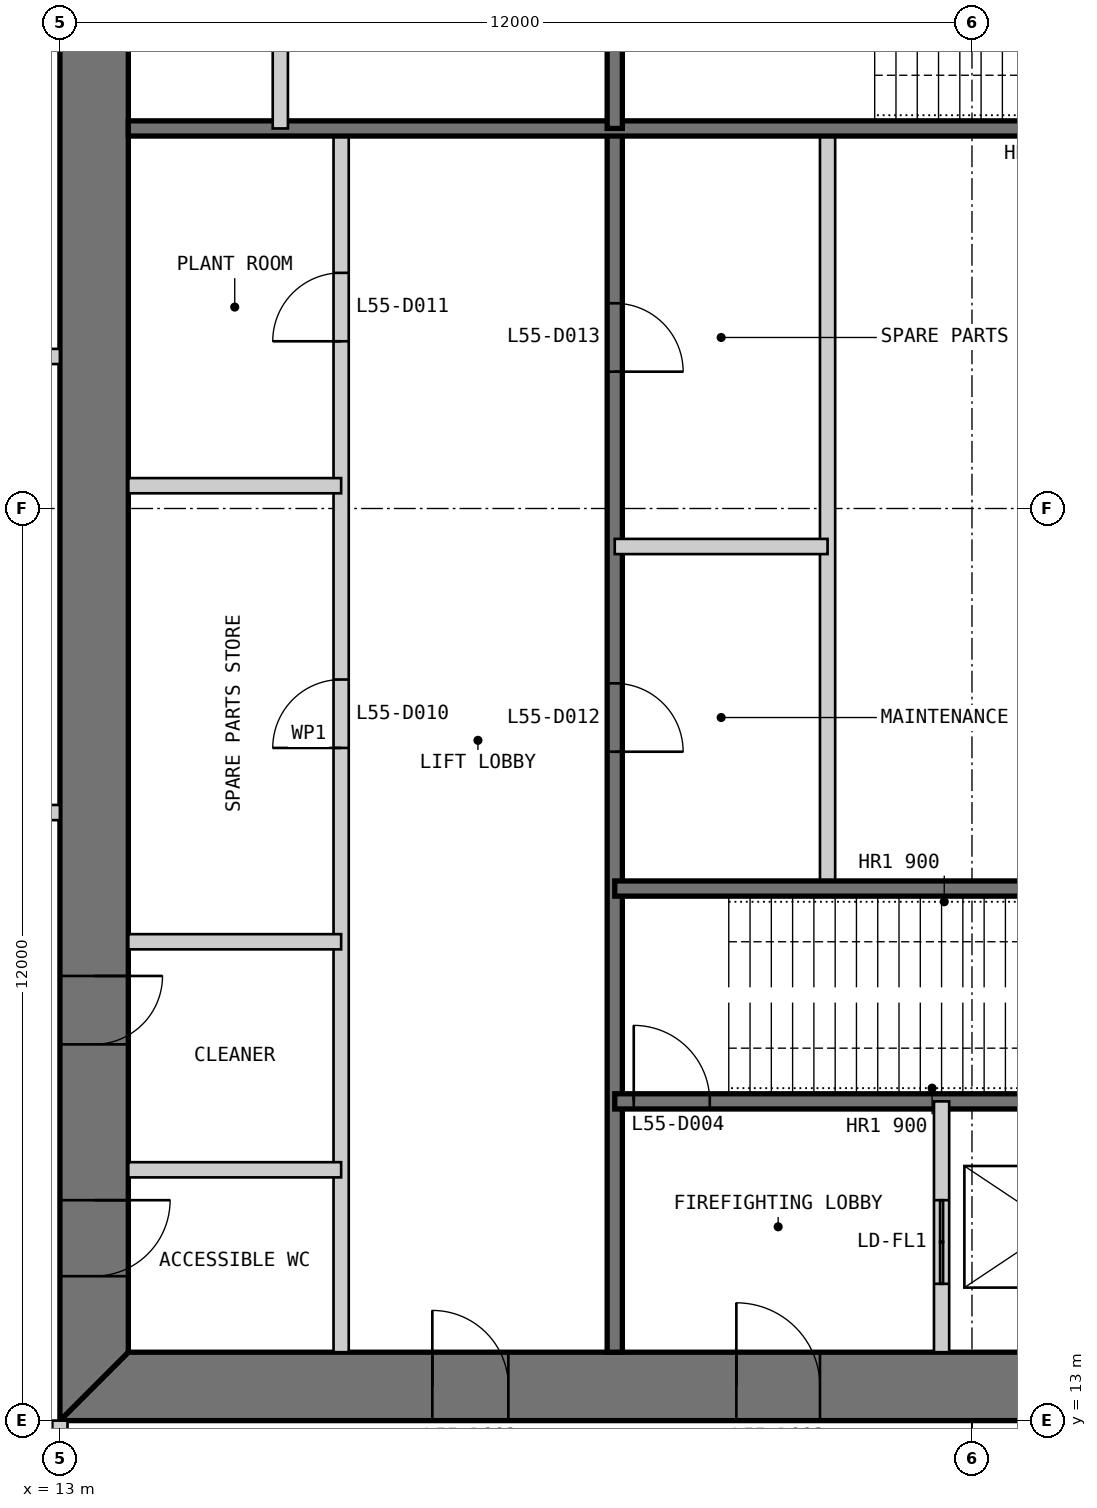
"""IFC4 building model, lengths in metres.
Left out: names, types, materials, properties, quantities, classifications, styles, units other than length and angle.
Written with IfcOpenShell. Run it as: python <this file> out.ifc"""

import sys

from ifc_helpers import new_model, si_unit, direction, frame, frame_2d, origin, place, context, subcontext, project, spatial, polyline, rectangle, outline, extrude, element, fill, save


model = new_model("IFC4")
c1 = context("Model", 3, precision=1e-05, world=origin(), true_north=direction((0.0, 1.0)))
c2 = subcontext(c1, "Body", "Model", "MODEL_VIEW")
j1 = project(units=[si_unit("LENGTHUNIT", "METRE"), si_unit("PLANEANGLEUNIT", "RADIAN")], contexts=[c1])
p1 = place(None, origin())
s1 = spatial("IfcSite", under=j1, at=p1, CompositionType="ELEMENT")
p2 = place(p1, origin())
s2 = spatial("IfcBuilding", under=s1, at=p2, CompositionType="ELEMENT")
p3 = place(p2, frame((0.0, 0.0, 233.8)))
s3 = spatial("IfcBuildingStorey", under=s2, at=p3, CompositionType="ELEMENT", Elevation=233.8)
p4 = place(p3, frame((13.0, 13.45, 0.0), z_axis=(0.0, 0.0, 1.0), x_axis=(1.0, 0.0, 0.0)))
e1 = element("IfcWall", 1, at=p4, inside=s3, PredefinedType="SHEAR", context=c2, shape_type="SweptSolid", body=[
    extrude(outline(polyline([(0.0, -0.45), (24.0, -0.45), (23.1, 0.45), (0.9, 0.45), (0.0, -0.45)])), origin(), (0.0, 0.0, 1.0), 6.0),
])
p5 = place(p4, frame((4.9, 0.0, 0.0)))
e2 = element("IfcOpeningElement", 2, at=p5, cuts=e1, PredefinedType="OPENING", context=c2, shape_type="SweptSolid", body=[
    extrude(rectangle(XDim=1.0, YDim=2.2, at=frame_2d((0.5, 1.1))), frame((0.0, 0.46, 0.0), z_axis=(0.0, -1.0, 0.0), x_axis=(1.0, 0.0, 0.0)), (0.0, 0.0, 1.0), 0.92),
])
p6 = place(p4, frame((8.9, 0.0, 0.0)))
e3 = element("IfcOpeningElement", 3, at=p6, cuts=e1, PredefinedType="OPENING", context=c2, shape_type="SweptSolid", body=[
    extrude(rectangle(XDim=1.1, YDim=2.2, at=frame_2d((0.55, 1.1))), frame((0.0, 0.46, 0.0), z_axis=(0.0, -1.0, 0.0), x_axis=(1.0, 0.0, 0.0)), (0.0, 0.0, 1.0), 0.92),
])
p7 = place(p4, frame((15.05, 0.0, 0.0)))
e4 = element("IfcOpeningElement", 4, at=p7, cuts=e1, PredefinedType="OPENING", context=c2, shape_type="SweptSolid", body=[
    extrude(rectangle(XDim=0.9, YDim=2.2, at=frame_2d((0.45, 1.1))), frame((0.0, 0.46, 0.0), z_axis=(0.0, -1.0, 0.0), x_axis=(1.0, 0.0, 0.0)), (0.0, 0.0, 1.0), 0.92),
])
p8 = place(p4, frame((17.9, 0.0, 0.0)))
e5 = element("IfcOpeningElement", 5, at=p8, cuts=e1, PredefinedType="OPENING", context=c2, shape_type="SweptSolid", body=[
    extrude(rectangle(XDim=1.0, YDim=2.2, at=frame_2d((0.5, 1.1))), frame((0.0, 0.46, 0.0), z_axis=(0.0, -1.0, 0.0), x_axis=(1.0, 0.0, 0.0)), (0.0, 0.0, 1.0), 0.92),
])
p9 = place(p4, frame((21.4, 0.0, 0.0)))
e6 = element("IfcOpeningElement", 6, at=p9, cuts=e1, PredefinedType="OPENING", context=c2, shape_type="SweptSolid", body=[
    extrude(rectangle(XDim=1.0, YDim=2.2, at=frame_2d((0.5, 1.1))), frame((0.0, 0.46, 0.0), z_axis=(0.0, -1.0, 0.0), x_axis=(1.0, 0.0, 0.0)), (0.0, 0.0, 1.0), 0.92),
])
p10 = place(p3, frame((13.45, 36.1, 0.0), z_axis=(0.0, 0.0, 1.0), x_axis=(0.0, -1.0, 0.0)))
e7 = element("IfcWall", 7, at=p10, inside=s3, PredefinedType="SHEAR", context=c2, shape_type="SweptSolid", body=[
    extrude(outline(polyline([(-0.9, -0.45), (23.1, -0.45), (22.2, 0.45), (0.0, 0.45), (-0.9, -0.45)])), origin(), (0.0, 0.0, 1.0), 6.0),
])
p11 = place(p10, frame((20.2, 0.0, 0.0)))
e8 = element("IfcOpeningElement", 8, at=p11, cuts=e7, PredefinedType="OPENING", context=c2, shape_type="SweptSolid", body=[
    extrude(rectangle(XDim=1.0, YDim=2.2, at=frame_2d((0.5, 1.1))), frame((0.0, 0.46, 0.0), z_axis=(0.0, -1.0, 0.0), x_axis=(1.0, 0.0, 0.0)), (0.0, 0.0, 1.0), 0.92),
])
p12 = place(p10, frame((17.25, 0.0, 0.0)))
e9 = element("IfcOpeningElement", 9, at=p12, cuts=e7, PredefinedType="OPENING", context=c2, shape_type="SweptSolid", body=[
    extrude(rectangle(XDim=0.9, YDim=2.2, at=frame_2d((0.45, 1.1))), frame((0.0, 0.46, 0.0), z_axis=(0.0, -1.0, 0.0), x_axis=(1.0, 0.0, 0.0)), (0.0, 0.0, 1.0), 0.92),
])
p13 = place(p3, frame((16.7, 13.9, 0.0), z_axis=(0.0, 0.0, 1.0), x_axis=(0.0, 1.0, 0.0)))
e10 = element("IfcWall", 10, at=p13, inside=s3, PredefinedType="PARTITIONING", context=c2, shape_type="SweptSolid", body=[
    extrude(rectangle(XDim=16.1, YDim=0.2, at=frame_2d((8.05, 0.0))), origin(), (0.0, 0.0, 1.0), 5.8),
])
p14 = place(p13, frame((7.95, 0.0, 0.0)))
e11 = element("IfcOpeningElement", 11, at=p14, cuts=e10, PredefinedType="OPENING", context=c2, shape_type="SweptSolid", body=[
    extrude(rectangle(XDim=0.9, YDim=2.2, at=frame_2d((0.45, 1.1))), frame((0.0, 0.11, 0.0), z_axis=(0.0, -1.0, 0.0), x_axis=(1.0, 0.0, 0.0)), (0.0, 0.0, 1.0), 0.22),
])
p15 = place(p13, frame((13.3, 0.0, 0.0)))
e12 = element("IfcOpeningElement", 12, at=p15, cuts=e10, PredefinedType="OPENING", context=c2, shape_type="SweptSolid", body=[
    extrude(rectangle(XDim=0.9, YDim=2.2, at=frame_2d((0.45, 1.1))), frame((0.0, 0.11, 0.0), z_axis=(0.0, -1.0, 0.0), x_axis=(1.0, 0.0, 0.0)), (0.0, 0.0, 1.0), 0.22),
])
p16 = place(p3, frame((20.3, 13.9, 0.0), z_axis=(0.0, 0.0, 1.0), x_axis=(0.0, 1.0, 0.0)))
e13 = element("IfcWall", 13, at=p16, inside=s3, PredefinedType="SOLIDWALL", context=c2, shape_type="SweptSolid", body=[
    extrude(rectangle(XDim=16.1, YDim=0.2, at=frame_2d((8.05, 0.0))), origin(), (0.0, 0.0, 1.0), 5.8),
])
p17 = place(p16, frame((7.9, 0.0, 0.0)))
e14 = element("IfcOpeningElement", 14, at=p17, cuts=e13, PredefinedType="OPENING", context=c2, shape_type="SweptSolid", body=[
    extrude(rectangle(XDim=0.9, YDim=2.2, at=frame_2d((0.45, 1.1))), frame((0.0, 0.11, 0.0), z_axis=(0.0, -1.0, 0.0), x_axis=(1.0, 0.0, 0.0)), (0.0, 0.0, 1.0), 0.22),
])
p18 = place(p16, frame((12.9, 0.0, 0.0)))
e15 = element("IfcOpeningElement", 15, at=p18, cuts=e13, PredefinedType="OPENING", context=c2, shape_type="SweptSolid", body=[
    extrude(rectangle(XDim=0.9, YDim=2.2, at=frame_2d((0.45, 1.1))), frame((0.0, 0.11, 0.0), z_axis=(0.0, -1.0, 0.0), x_axis=(1.0, 0.0, 0.0)), (0.0, 0.0, 1.0), 0.22),
])
p19 = place(p3, frame((23.1, 20.0, 0.0), z_axis=(0.0, 0.0, 1.0), x_axis=(0.0, 1.0, 0.0)))
e16 = element("IfcWall", 16, at=p19, inside=s3, PredefinedType="PARTITIONING", context=c2, shape_type="SweptSolid", body=[
    extrude(rectangle(XDim=10.0, YDim=0.2, at=frame_2d((5.0, 0.0))), origin(), (0.0, 0.0, 1.0), 5.8),
])
p20 = place(p3, frame((20.3, 17.2, 0.0), z_axis=(0.0, 0.0, 1.0), x_axis=(1.0, 0.0, 0.0)))
e17 = element("IfcWall", 17, at=p20, inside=s3, PredefinedType="SOLIDWALL", context=c2, shape_type="SweptSolid", body=[
    extrude(rectangle(XDim=9.4, YDim=0.2, at=frame_2d((4.7, 0.0))), origin(), (0.0, 0.0, 1.0), 5.8),
])
p21 = place(p20, frame((0.25, 0.0, 0.0)))
e18 = element("IfcOpeningElement", 18, at=p21, cuts=e17, PredefinedType="OPENING", context=c2, shape_type="SweptSolid", body=[
    extrude(rectangle(XDim=1.0, YDim=2.2, at=frame_2d((0.5, 1.1))), frame((0.0, 0.11, 0.0), z_axis=(0.0, -1.0, 0.0), x_axis=(1.0, 0.0, 0.0)), (0.0, 0.0, 1.0), 0.22),
])
p22 = place(p3, frame((20.3, 20.0, 0.0), z_axis=(0.0, 0.0, 1.0), x_axis=(1.0, 0.0, 0.0)))
e19 = element("IfcWall", 19, at=p22, inside=s3, PredefinedType="SOLIDWALL", context=c2, shape_type="SweptSolid", body=[
    extrude(rectangle(XDim=15.8, YDim=0.2, at=frame_2d((7.9, 0.0))), origin(), (0.0, 0.0, 1.0), 5.8),
])
p23 = place(p3, frame((24.6, 13.9, 0.0), z_axis=(0.0, 0.0, 1.0), x_axis=(0.0, 1.0, 0.0)))
e20 = element("IfcWall", 20, at=p23, inside=s3, PredefinedType="PARTITIONING", context=c2, shape_type="SweptSolid", body=[
    extrude(rectangle(XDim=3.3, YDim=0.2, at=frame_2d((1.65, 0.0))), origin(), (0.0, 0.0, 1.0), 5.8),
])
p24 = place(p23, frame((0.9, 0.0, 0.0)))
e21 = element("IfcOpeningElement", 21, at=p24, cuts=e20, PredefinedType="OPENING", context=c2, shape_type="SweptSolid", body=[
    extrude(rectangle(XDim=1.1, YDim=2.2, at=frame_2d((0.55, 1.1))), frame((0.0, 0.11, 0.0), z_axis=(0.0, -1.0, 0.0), x_axis=(1.0, 0.0, 0.0)), (0.0, 0.0, 1.0), 0.22),
])
for number, where, z_axis, x_axis in (
    (22, (13.9, 16.3, 0.0), (0.0, 0.0, 1.0), (1.0, 0.0, 0.0)),
    (23, (13.9, 19.3, 0.0), (0.0, 0.0, 1.0), (1.0, 0.0, 0.0)),
    (24, (13.9, 25.3, 0.0), (0.0, 0.0, 1.0), (1.0, 0.0, 0.0)),
    (25, (20.3, 24.5, 0.0), (0.0, 0.0, 1.0), (1.0, 0.0, 0.0)),
):
    element("IfcWall", number, at=place(p3, frame(where, z_axis=z_axis, x_axis=x_axis)), inside=s3, PredefinedType="PARTITIONING", context=c2, shape_type="SweptSolid", body=[
        extrude(rectangle(XDim=2.8, YDim=0.2, at=frame_2d((1.4, 0.0))), origin(), (0.0, 0.0, 1.0), 5.8),
    ])
p25 = place(p3, frame((29.7, 30.0, 0.0), z_axis=(0.0, 0.0, 1.0), x_axis=(-1.0, 0.0, 0.0)))
e26 = element("IfcWall", 26, at=p25, inside=s3, PredefinedType="SOLIDWALL", context=c2, shape_type="SweptSolid", body=[
    extrude(rectangle(XDim=15.8, YDim=0.2, at=frame_2d((7.9, 0.0))), origin(), (0.0, 0.0, 1.0), 5.8),
])
p26 = place(p3, frame((20.3, 36.1, 0.0), z_axis=(0.0, 0.0, 1.0), x_axis=(0.0, -1.0, 0.0)))
e27 = element("IfcWall", 27, at=p26, inside=s3, PredefinedType="SOLIDWALL", context=c2, shape_type="SweptSolid", body=[
    extrude(rectangle(XDim=6.1, YDim=0.2, at=frame_2d((3.05, 0.0))), origin(), (0.0, 0.0, 1.0), 5.8),
])
p27 = place(p3, frame((15.9, 36.1, 0.0), z_axis=(0.0, 0.0, 1.0), x_axis=(0.0, -1.0, 0.0)))
e28 = element("IfcWall", 28, at=p27, inside=s3, PredefinedType="PARTITIONING", context=c2, shape_type="SweptSolid", body=[
    extrude(rectangle(XDim=6.1, YDim=0.2, at=frame_2d((3.05, 0.0))), origin(), (0.0, 0.0, 1.0), 5.8),
])
p28 = place(p3, frame((13.0, 10.6, 0.0), z_axis=(0.0, 0.0, 1.0), x_axis=(0.0, 1.0, 0.0)))
e29 = element("IfcWall", 29, at=p28, inside=s3, PredefinedType="PARTITIONING", context=c2, shape_type="SweptSolid", body=[
    extrude(rectangle(XDim=2.4, YDim=0.2, at=frame_2d((1.2, 0.0))), origin(), (0.0, 0.0, 1.0), 4.705),
])
p29 = place(p3, frame((2.0, 21.0, 0.0), z_axis=(0.0, 0.0, 1.0), x_axis=(1.0, 0.0, 0.0)))
e30 = element("IfcWall", 30, at=p29, inside=s3, PredefinedType="PARTITIONING", context=c2, shape_type="SweptSolid", body=[
    extrude(rectangle(XDim=11.0, YDim=0.2, at=frame_2d((5.5, 0.0))), origin(), (0.0, 0.0, 1.0), 5.8),
])
p30 = place(p29, frame((4.6, 0.0, 0.0)))
e31 = element("IfcOpeningElement", 31, at=p30, cuts=e30, PredefinedType="OPENING", context=c2, shape_type="SweptSolid", body=[
    extrude(rectangle(XDim=1.8, YDim=2.4, at=frame_2d((0.9, 1.2))), frame((0.0, 0.11, 0.0), z_axis=(0.0, -1.0, 0.0), x_axis=(1.0, 0.0, 0.0)), (0.0, 0.0, 1.0), 0.22),
])
p31 = place(p3, frame((2.0, 27.0, 0.0), z_axis=(0.0, 0.0, 1.0), x_axis=(1.0, 0.0, 0.0)))
e32 = element("IfcWall", 32, at=p31, inside=s3, PredefinedType="PARTITIONING", context=c2, shape_type="SweptSolid", body=[
    extrude(rectangle(XDim=11.0, YDim=0.2, at=frame_2d((5.5, 0.0))), origin(), (0.0, 0.0, 1.0), 5.8),
])
p32 = place(p31, frame((4.6, 0.0, 0.0)))
e33 = element("IfcOpeningElement", 33, at=p32, cuts=e32, PredefinedType="OPENING", context=c2, shape_type="SweptSolid", body=[
    extrude(rectangle(XDim=1.8, YDim=2.4, at=frame_2d((0.9, 1.2))), frame((0.0, 0.11, 0.0), z_axis=(0.0, -1.0, 0.0), x_axis=(1.0, 0.0, 0.0)), (0.0, 0.0, 1.0), 0.22),
])
p33 = place(p5, origin())
e34 = element("IfcDoor", 34, at=p33, inside=s3, OperationType="SINGLE_SWING_LEFT", PredefinedType="DOOR", context=c2, shape_type="SweptSolid", body=[
    extrude(rectangle(XDim=1.0, YDim=2.2, at=frame_2d((0.5, 1.1))), frame((0.0, 0.025, 0.0), z_axis=(0.0, -1.0, 0.0), x_axis=(1.0, 0.0, 0.0)), (0.0, 0.0, 1.0), 0.05),
    extrude(outline(polyline([(0.0, 0.0), (0.04, 0.0), (0.04, 2.16), (0.96, 2.16), (0.96, 0.0), (1.0, 0.0), (1.0, 2.2), (0.0, 2.2), (0.0, 0.0)])), frame((0.0, 0.3, 0.0), z_axis=(0.0, -1.0, 0.0), x_axis=(1.0, 0.0, 0.0)), (0.0, 0.0, 1.0), 0.6),
])
fill(e2, e34)
p34 = place(p6, origin())
e35 = element("IfcDoor", 35, at=p34, inside=s3, OperationType="SINGLE_SWING_LEFT", PredefinedType="DOOR", context=c2, shape_type="SweptSolid", body=[
    extrude(rectangle(XDim=1.1, YDim=2.2, at=frame_2d((0.55, 1.1))), frame((0.0, 0.025, 0.0), z_axis=(0.0, -1.0, 0.0), x_axis=(1.0, 0.0, 0.0)), (0.0, 0.0, 1.0), 0.05),
    extrude(outline(polyline([(0.0, 0.0), (0.04, 0.0), (0.04, 2.16), (1.06, 2.16), (1.06, 0.0), (1.1, 0.0), (1.1, 2.2), (0.0, 2.2), (0.0, 0.0)])), frame((0.0, 0.3, 0.0), z_axis=(0.0, -1.0, 0.0), x_axis=(1.0, 0.0, 0.0)), (0.0, 0.0, 1.0), 0.6),
])
fill(e3, e35)
p35 = place(p21, origin())
e36 = element("IfcDoor", 36, at=p35, inside=s3, OperationType="SINGLE_SWING_LEFT", PredefinedType="DOOR", context=c2, shape_type="SweptSolid", body=[
    extrude(rectangle(XDim=1.0, YDim=2.2, at=frame_2d((0.5, 1.1))), frame((0.0, 0.025, 0.0), z_axis=(0.0, -1.0, 0.0), x_axis=(1.0, 0.0, 0.0)), (0.0, 0.0, 1.0), 0.05),
])
fill(e18, e36)
p36 = place(p11, origin())
e37 = element("IfcDoor", 37, at=p36, inside=s3, OperationType="SINGLE_SWING_LEFT", PredefinedType="DOOR", context=c2, shape_type="SweptSolid", body=[
    extrude(rectangle(XDim=1.0, YDim=2.2, at=frame_2d((0.5, 1.1))), frame((0.0, 0.025, 0.0), z_axis=(0.0, -1.0, 0.0), x_axis=(1.0, 0.0, 0.0)), (0.0, 0.0, 1.0), 0.05),
    extrude(outline(polyline([(0.0, 0.0), (0.04, 0.0), (0.04, 2.16), (0.96, 2.16), (0.96, 0.0), (1.0, 0.0), (1.0, 2.2), (0.0, 2.2), (0.0, 0.0)])), frame((0.0, 0.3, 0.0), z_axis=(0.0, -1.0, 0.0), x_axis=(1.0, 0.0, 0.0)), (0.0, 0.0, 1.0), 0.6),
])
fill(e8, e37)
p37 = place(p12, origin())
e38 = element("IfcDoor", 38, at=p37, inside=s3, OperationType="SINGLE_SWING_LEFT", PredefinedType="DOOR", context=c2, shape_type="SweptSolid", body=[
    extrude(rectangle(XDim=0.9, YDim=2.2, at=frame_2d((0.45, 1.1))), frame((0.0, 0.025, 0.0), z_axis=(0.0, -1.0, 0.0), x_axis=(1.0, 0.0, 0.0)), (0.0, 0.0, 1.0), 0.05),
    extrude(outline(polyline([(0.0, 0.0), (0.04, 0.0), (0.04, 2.16), (0.86, 2.16), (0.86, 0.0), (0.9, 0.0), (0.9, 2.2), (0.0, 2.2), (0.0, 0.0)])), frame((0.0, 0.3, 0.0), z_axis=(0.0, -1.0, 0.0), x_axis=(1.0, 0.0, 0.0)), (0.0, 0.0, 1.0), 0.6),
])
fill(e9, e38)
p38 = place(p14, origin())
e39 = element("IfcDoor", 39, at=p38, inside=s3, OperationType="SINGLE_SWING_LEFT", PredefinedType="DOOR", context=c2, shape_type="SweptSolid", body=[
    extrude(rectangle(XDim=0.9, YDim=2.2, at=frame_2d((0.45, 1.1))), frame((0.0, 0.025, 0.0), z_axis=(0.0, -1.0, 0.0), x_axis=(1.0, 0.0, 0.0)), (0.0, 0.0, 1.0), 0.05),
])
fill(e11, e39)
p39 = place(p15, origin())
e40 = element("IfcDoor", 40, at=p39, inside=s3, OperationType="SINGLE_SWING_LEFT", PredefinedType="DOOR", context=c2, shape_type="SweptSolid", body=[
    extrude(rectangle(XDim=0.9, YDim=2.2, at=frame_2d((0.45, 1.1))), frame((0.0, 0.025, 0.0), z_axis=(0.0, -1.0, 0.0), x_axis=(1.0, 0.0, 0.0)), (0.0, 0.0, 1.0), 0.05),
])
fill(e12, e40)
p40 = place(p17, frame((0.9, 0.0, 0.0), z_axis=(0.0, 0.0, 1.0), x_axis=(-1.0, 0.0, 0.0)))
e41 = element("IfcDoor", 41, at=p40, inside=s3, OperationType="SINGLE_SWING_RIGHT", PredefinedType="DOOR", context=c2, shape_type="SweptSolid", body=[
    extrude(rectangle(XDim=0.9, YDim=2.2, at=frame_2d((0.45, 1.1))), frame((0.0, 0.025, 0.0), z_axis=(0.0, -1.0, 0.0), x_axis=(1.0, 0.0, 0.0)), (0.0, 0.0, 1.0), 0.05),
])
fill(e14, e41)
p41 = place(p18, frame((0.9, 0.0, 0.0), z_axis=(0.0, 0.0, 1.0), x_axis=(-1.0, 0.0, 0.0)))
e42 = element("IfcDoor", 42, at=p41, inside=s3, OperationType="SINGLE_SWING_RIGHT", PredefinedType="DOOR", context=c2, shape_type="SweptSolid", body=[
    extrude(rectangle(XDim=0.9, YDim=2.2, at=frame_2d((0.45, 1.1))), frame((0.0, 0.025, 0.0), z_axis=(0.0, -1.0, 0.0), x_axis=(1.0, 0.0, 0.0)), (0.0, 0.0, 1.0), 0.05),
])
fill(e15, e42)
p42 = place(p24, origin())
e43 = element("IfcDoor", 43, at=p42, inside=s3, OperationType="DOUBLE_DOOR_SLIDING", PredefinedType="DOOR", context=c2, shape_type="SweptSolid", body=[
    extrude(rectangle(XDim=1.1, YDim=2.2, at=frame_2d((0.55, 1.1))), frame((0.0, 0.025, 0.0), z_axis=(0.0, -1.0, 0.0), x_axis=(1.0, 0.0, 0.0)), (0.0, 0.0, 1.0), 0.05),
])
fill(e21, e43)
save(model, sys.argv[1])
